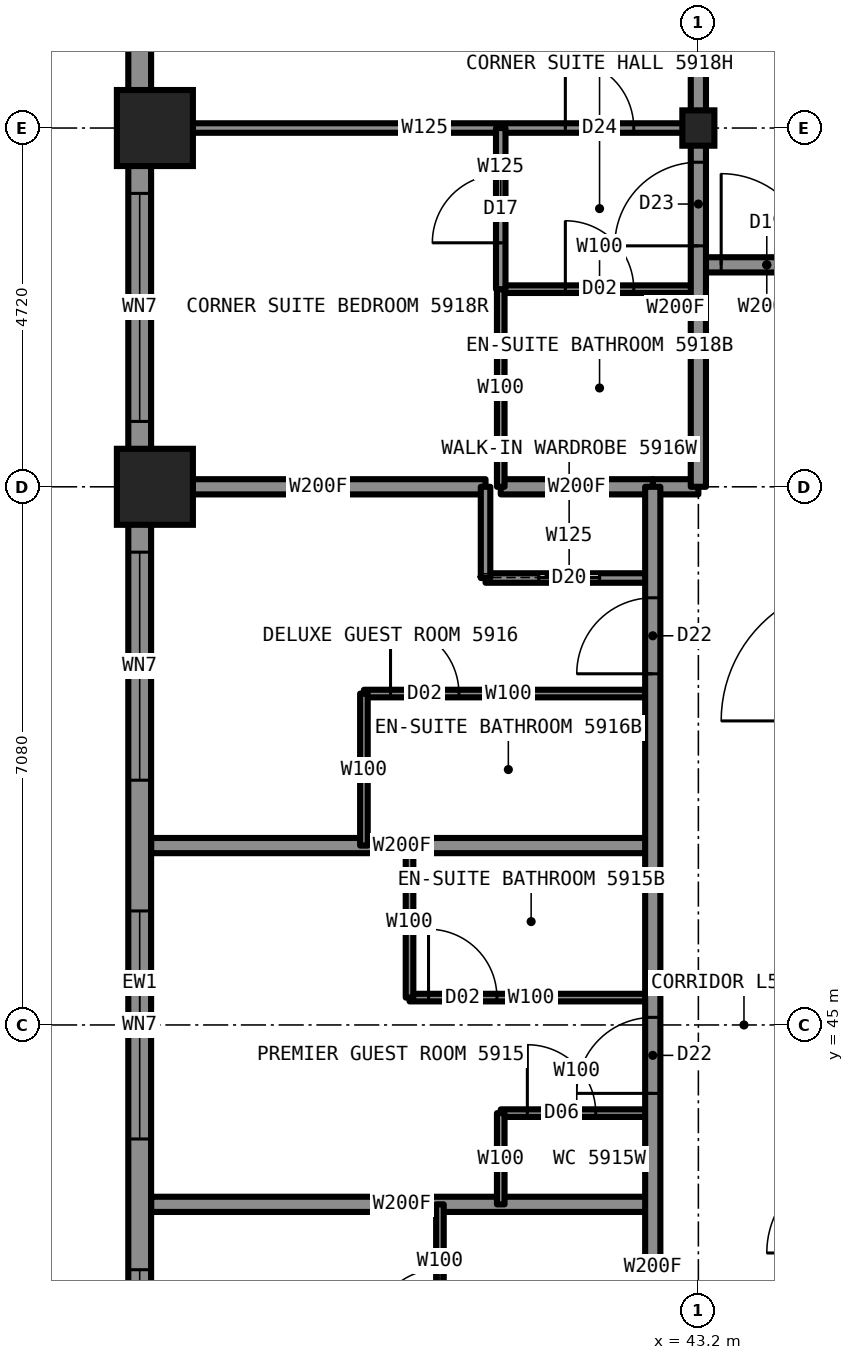
"""IFC4 building model, lengths in metres.
Left out: names, types, materials, properties, quantities, classifications, styles, units other than length and angle.
Written with IfcOpenShell. Run it as: python <this file> out.ifc"""

import sys

from ifc_helpers import new_model, si_unit, direction, frame, frame_2d, origin, origin_2d, place, context, subcontext, project, spatial, rectangle, i_section, extrude, element, fill, save


model = new_model("IFC4")
c1 = context("Model", 3, precision=1e-05, world=origin(), true_north=direction((0.0, 1.0)))
c2 = subcontext(c1, "Body", "Model", "MODEL_VIEW")
j1 = project(units=[si_unit("LENGTHUNIT", "METRE"), si_unit("PLANEANGLEUNIT", "RADIAN")], contexts=[c1])
p1 = place(None, origin())
s1 = spatial("IfcSite", under=j1, at=p1, CompositionType="ELEMENT")
p2 = place(p1, origin())
s2 = spatial("IfcBuilding", under=s1, at=p2, CompositionType="ELEMENT")
p3 = place(p2, frame((0.0, 0.0, 214.3)))
s3 = spatial("IfcBuildingStorey", under=s2, at=p3, CompositionType="ELEMENT", Elevation=214.3)
for number, where, z_axis, x_axis in (
    (1, (36.05, 52.08, 0.0), (0.0, 0.0, 1.0), (1.0, 0.0, 0.0)),
    (2, (36.05, 56.8, 0.0), (0.0, 0.0, 1.0), (1.0, 0.0, 0.0)),
):
    element("IfcColumn", number, at=place(p3, frame(where, z_axis=z_axis, x_axis=x_axis)), inside=s3, PredefinedType="COLUMN", context=c2, shape_type="SweptSolid", body=[
        extrude(i_section(OverallWidth=0.411, OverallDepth=0.434, WebThickness=0.036, FlangeThickness=0.057, at=origin_2d()), origin(), (0.0, 0.0, 1.0), 3.5),
    ])
p4 = place(p3, frame((43.2, 56.8, 0.0), z_axis=(0.0, 0.0, 1.0), x_axis=(1.0, 0.0, 0.0)))
e3 = element("IfcColumn", 3, at=p4, inside=s3, PredefinedType="COLUMN", context=c2, shape_type="SweptSolid", body=[
    extrude(i_section(OverallWidth=0.422, OverallDepth=0.465, WebThickness=0.045, FlangeThickness=0.073, at=origin_2d()), origin(), (0.0, 0.0, 1.0), 3.5),
])
p5 = place(p3, frame((40.6, 43.84, 0.0), z_axis=(0.0, 0.0, 1.0), x_axis=(1.0, 0.0, 0.0)))
e4 = element("IfcWall", 4, at=p5, inside=s3, PredefinedType="PARTITIONING", context=c2, shape_type="SweptSolid", body=[
    extrude(rectangle(XDim=2.0, YDim=0.1, at=frame_2d((1.0, 0.0))), origin(), (0.0, 0.0, 1.0), 3.33),
])
p6 = place(p5, frame((0.35, 0.0, 0.0)))
e5 = element("IfcOpeningElement", 5, at=p6, cuts=e4, PredefinedType="OPENING", context=c2, shape_type="SweptSolid", body=[
    extrude(rectangle(XDim=0.9, YDim=2.1, at=frame_2d((0.45, 1.05))), frame((0.0, 0.06, 0.0), z_axis=(0.0, -1.0, 0.0), x_axis=(1.0, 0.0, 0.0)), (0.0, 0.0, 1.0), 0.12),
])
p7 = place(p3, frame((36.0, 42.64, 0.0), z_axis=(0.0, 0.0, 1.0), x_axis=(1.0, 0.0, 0.0)))
e6 = element("IfcWall", 6, at=p7, inside=s3, PredefinedType="PARTITIONING", context=c2, shape_type="SweptSolid", body=[
    extrude(rectangle(XDim=6.6, YDim=0.2, at=frame_2d((3.3, 0.0))), origin(), (0.0, 0.0, 1.0), 2.73),
])
p8 = place(p3, frame((39.4, 45.36, 0.0), z_axis=(0.0, 0.0, 1.0), x_axis=(1.0, 0.0, 0.0)))
e7 = element("IfcWall", 7, at=p8, inside=s3, PredefinedType="PARTITIONING", context=c2, shape_type="SweptSolid", body=[
    extrude(rectangle(XDim=3.2, YDim=0.1, at=frame_2d((1.6, 0.0))), origin(), (0.0, 0.0, 1.0), 3.33),
])
p9 = place(p8, frame((0.25, 0.0, 0.0)))
e8 = element("IfcOpeningElement", 8, at=p9, cuts=e7, PredefinedType="OPENING", context=c2, shape_type="SweptSolid", body=[
    extrude(rectangle(XDim=0.9, YDim=2.1, at=frame_2d((0.45, 1.05))), frame((0.0, 0.06, 0.0), z_axis=(0.0, -1.0, 0.0), x_axis=(1.0, 0.0, 0.0)), (0.0, 0.0, 1.0), 0.12),
])
p10 = place(p3, frame((43.2, 55.0, 0.0), z_axis=(0.0, 0.0, 1.0), x_axis=(1.0, 0.0, 0.0)))
e9 = element("IfcWall", 9, at=p10, inside=s3, PredefinedType="PARTITIONING", context=c2, shape_type="SweptSolid", body=[
    extrude(rectangle(XDim=1.8, YDim=0.2, at=frame_2d((0.9, 0.0))), origin(), (0.0, 0.0, 1.0), 3.33),
])
p11 = place(p10, frame((0.3, 0.0, 0.0)))
e10 = element("IfcOpeningElement", 10, at=p11, cuts=e9, PredefinedType="OPENING", context=c2, shape_type="SweptSolid", body=[
    extrude(rectangle(XDim=1.2, YDim=2.2, at=frame_2d((0.6, 1.1))), frame((0.0, 0.11, 0.0), z_axis=(0.0, -1.0, 0.0), x_axis=(1.0, 0.0, 0.0)), (0.0, 0.0, 1.0), 0.22),
])
p12 = place(p3, frame((36.0, 56.8, 0.0), z_axis=(0.0, 0.0, 1.0), x_axis=(1.0, 0.0, 0.0)))
e11 = element("IfcWall", 11, at=p12, inside=s3, PredefinedType="PARTITIONING", context=c2, shape_type="SweptSolid", body=[
    extrude(rectangle(XDim=7.2, YDim=0.125, at=frame_2d((3.6, 0.0))), origin(), (0.0, 0.0, 1.0), 2.573),
])
p13 = place(p12, frame((5.45, 0.0, 0.0)))
e12 = element("IfcOpeningElement", 12, at=p13, cuts=e11, PredefinedType="OPENING", context=c2, shape_type="SweptSolid", body=[
    extrude(rectangle(XDim=0.9, YDim=2.2, at=frame_2d((0.45, 1.1))), frame((0.0, 0.073, 0.0), z_axis=(0.0, -1.0, 0.0), x_axis=(1.0, 0.0, 0.0)), (0.0, 0.0, 1.0), 0.145),
])
p14 = place(p3, frame((36.0, 47.36, 0.0), z_axis=(0.0, 0.0, 1.0), x_axis=(1.0, 0.0, 0.0)))
e13 = element("IfcWall", 13, at=p14, inside=s3, PredefinedType="PARTITIONING", context=c2, shape_type="SweptSolid", body=[
    extrude(rectangle(XDim=6.6, YDim=0.2, at=frame_2d((3.3, 0.0))), origin(), (0.0, 0.0, 1.0), 2.73),
])
p15 = place(p3, frame((38.8, 49.36, 0.0), z_axis=(0.0, 0.0, 1.0), x_axis=(1.0, 0.0, 0.0)))
e14 = element("IfcWall", 14, at=p15, inside=s3, PredefinedType="PARTITIONING", context=c2, shape_type="SweptSolid", body=[
    extrude(rectangle(XDim=3.8, YDim=0.1, at=frame_2d((1.9, 0.0))), origin(), (0.0, 0.0, 1.0), 3.33),
])
p16 = place(p15, frame((0.35, 0.0, 0.0)))
e15 = element("IfcOpeningElement", 15, at=p16, cuts=e14, PredefinedType="OPENING", context=c2, shape_type="SweptSolid", body=[
    extrude(rectangle(XDim=0.9, YDim=2.1, at=frame_2d((0.45, 1.05))), frame((0.0, 0.06, 0.0), z_axis=(0.0, -1.0, 0.0), x_axis=(1.0, 0.0, 0.0)), (0.0, 0.0, 1.0), 0.12),
])
p17 = place(p3, frame((40.4, 50.88, 0.0), z_axis=(0.0, 0.0, 1.0), x_axis=(1.0, 0.0, 0.0)))
e16 = element("IfcWall", 16, at=p17, inside=s3, PredefinedType="PARTITIONING", context=c2, shape_type="SweptSolid", body=[
    extrude(rectangle(XDim=2.2, YDim=0.125, at=frame_2d((1.1, 0.0))), origin(), (0.0, 0.0, 1.0), 3.33),
])
p18 = place(p17, frame((0.7, 0.0, 0.0)))
e17 = element("IfcOpeningElement", 17, at=p18, cuts=e16, PredefinedType="OPENING", context=c2, shape_type="SweptSolid", body=[
    extrude(rectangle(XDim=0.8, YDim=2.1, at=frame_2d((0.4, 1.05))), frame((0.0, 0.073, 0.0), z_axis=(0.0, -1.0, 0.0), x_axis=(1.0, 0.0, 0.0)), (0.0, 0.0, 1.0), 0.145),
])
p19 = place(p3, frame((42.6, 52.08, 0.0), z_axis=(0.0, 0.0, 1.0), x_axis=(1.0, 0.0, 0.0)))
e18 = element("IfcWall", 18, at=p19, inside=s3, PredefinedType="PARTITIONING", context=c2, shape_type="SweptSolid", body=[
    extrude(rectangle(XDim=0.6, YDim=0.2, at=frame_2d((0.3, 0.0))), origin(), (0.0, 0.0, 1.0), 2.573),
])
p20 = place(p3, frame((36.0, 52.08, 0.0), z_axis=(0.0, 0.0, 1.0), x_axis=(1.0, 0.0, 0.0)))
e19 = element("IfcWall", 19, at=p20, inside=s3, PredefinedType="PARTITIONING", context=c2, shape_type="SweptSolid", body=[
    extrude(rectangle(XDim=4.4, YDim=0.2, at=frame_2d((2.2, 0.0))), origin(), (0.0, 0.0, 1.0), 2.573),
])
p21 = place(p3, frame((40.6, 52.08, 0.0), z_axis=(0.0, 0.0, 1.0), x_axis=(1.0, 0.0, 0.0)))
e20 = element("IfcWall", 20, at=p21, inside=s3, PredefinedType="PARTITIONING", context=c2, shape_type="SweptSolid", body=[
    extrude(rectangle(XDim=2.0, YDim=0.2, at=frame_2d((1.0, 0.0))), origin(), (0.0, 0.0, 1.0), 2.573),
])
p22 = place(p3, frame((40.6, 54.68, 0.0), z_axis=(0.0, 0.0, 1.0), x_axis=(1.0, 0.0, 0.0)))
e21 = element("IfcWall", 21, at=p22, inside=s3, PredefinedType="PARTITIONING", context=c2, shape_type="SweptSolid", body=[
    extrude(rectangle(XDim=2.6, YDim=0.1, at=frame_2d((1.3, 0.0))), origin(), (0.0, 0.0, 1.0), 3.33),
])
p23 = place(p22, frame((0.85, 0.0, 0.0)))
e22 = element("IfcOpeningElement", 22, at=p23, cuts=e21, PredefinedType="OPENING", context=c2, shape_type="SweptSolid", body=[
    extrude(rectangle(XDim=0.9, YDim=2.1, at=frame_2d((0.45, 1.05))), frame((0.0, 0.06, 0.0), z_axis=(0.0, -1.0, 0.0), x_axis=(1.0, 0.0, 0.0)), (0.0, 0.0, 1.0), 0.12),
])
p24 = place(p3, frame((43.2, 52.08, 0.0), z_axis=(0.0, 0.0, 1.0), x_axis=(0.0, 1.0, 0.0)))
e23 = element("IfcWall", 23, at=p24, inside=s3, PredefinedType="PARTITIONING", context=c2, shape_type="SweptSolid", body=[
    extrude(rectangle(XDim=4.7, YDim=0.2, at=frame_2d((2.35, 0.0))), origin(), (0.0, 0.0, 1.0), 3.33),
])
p25 = place(p24, frame((3.17, 0.0, 0.0)))
e24 = element("IfcOpeningElement", 24, at=p25, cuts=e23, PredefinedType="OPENING", context=c2, shape_type="SweptSolid", body=[
    extrude(rectangle(XDim=1.1, YDim=2.2, at=frame_2d((0.55, 1.1))), frame((0.0, 0.11, 0.0), z_axis=(0.0, -1.0, 0.0), x_axis=(1.0, 0.0, 0.0)), (0.0, 0.0, 1.0), 0.22),
])
p26 = place(p3, frame((42.6, 37.92, 0.0), z_axis=(0.0, 0.0, 1.0), x_axis=(0.0, 1.0, 0.0)))
e25 = element("IfcWall", 25, at=p26, inside=s3, PredefinedType="PARTITIONING", context=c2, shape_type="SweptSolid", body=[
    extrude(rectangle(XDim=14.16, YDim=0.2, at=frame_2d((7.08, 0.0))), origin(), (0.0, 0.0, 1.0), 3.33),
])
p27 = place(p26, frame((0.4, 0.0, 0.0)))
e26 = element("IfcOpeningElement", 26, at=p27, cuts=e25, PredefinedType="OPENING", context=c2, shape_type="SweptSolid", body=[
    extrude(rectangle(XDim=1.0, YDim=2.2, at=frame_2d((0.5, 1.1))), frame((0.0, 0.11, 0.0), z_axis=(0.0, -1.0, 0.0), x_axis=(1.0, 0.0, 0.0)), (0.0, 0.0, 1.0), 0.22),
])
p28 = place(p26, frame((6.18, 0.0, 0.0)))
e27 = element("IfcOpeningElement", 27, at=p28, cuts=e25, PredefinedType="OPENING", context=c2, shape_type="SweptSolid", body=[
    extrude(rectangle(XDim=1.0, YDim=2.2, at=frame_2d((0.5, 1.1))), frame((0.0, 0.11, 0.0), z_axis=(0.0, -1.0, 0.0), x_axis=(1.0, 0.0, 0.0)), (0.0, 0.0, 1.0), 0.22),
])
p29 = place(p26, frame((11.7, 0.0, 0.0)))
e28 = element("IfcOpeningElement", 28, at=p29, cuts=e25, PredefinedType="OPENING", context=c2, shape_type="SweptSolid", body=[
    extrude(rectangle(XDim=1.0, YDim=2.2, at=frame_2d((0.5, 1.1))), frame((0.0, 0.11, 0.0), z_axis=(0.0, -1.0, 0.0), x_axis=(1.0, 0.0, 0.0)), (0.0, 0.0, 1.0), 0.22),
])
p30 = place(p3, frame((40.6, 42.64, 0.0), z_axis=(0.0, 0.0, 1.0), x_axis=(0.0, 1.0, 0.0)))
e29 = element("IfcWall", 29, at=p30, inside=s3, PredefinedType="PARTITIONING", context=c2, shape_type="SweptSolid", body=[
    extrude(rectangle(XDim=1.2, YDim=0.1, at=frame_2d((0.6, 0.0))), origin(), (0.0, 0.0, 1.0), 3.33),
])
p31 = place(p3, frame((40.6, 52.08, 0.0), z_axis=(0.0, 0.0, 1.0), x_axis=(0.0, 1.0, 0.0)))
e30 = element("IfcWall", 30, at=p31, inside=s3, PredefinedType="PARTITIONING", context=c2, shape_type="SweptSolid", body=[
    extrude(rectangle(XDim=2.6, YDim=0.1, at=frame_2d((1.3, 0.0))), origin(), (0.0, 0.0, 1.0), 3.33),
])
p32 = place(p3, frame((40.6, 54.68, 0.0), z_axis=(0.0, 0.0, 1.0), x_axis=(0.0, 1.0, 0.0)))
e31 = element("IfcWall", 31, at=p32, inside=s3, PredefinedType="PARTITIONING", context=c2, shape_type="SweptSolid", body=[
    extrude(rectangle(XDim=2.12, YDim=0.125, at=frame_2d((1.06, 0.0))), origin(), (0.0, 0.0, 1.0), 3.33),
])
p33 = place(p32, frame((0.61, 0.0, 0.0)))
e32 = element("IfcOpeningElement", 32, at=p33, cuts=e31, PredefinedType="OPENING", context=c2, shape_type="SweptSolid", body=[
    extrude(rectangle(XDim=0.9, YDim=2.2, at=frame_2d((0.45, 1.1))), frame((0.0, 0.073, 0.0), z_axis=(0.0, -1.0, 0.0), x_axis=(1.0, 0.0, 0.0)), (0.0, 0.0, 1.0), 0.145),
])
p34 = place(p3, frame((40.4, 50.88, 0.0), z_axis=(0.0, 0.0, 1.0), x_axis=(0.0, 1.0, 0.0)))
e33 = element("IfcWall", 33, at=p34, inside=s3, PredefinedType="PARTITIONING", context=c2, shape_type="SweptSolid", body=[
    extrude(rectangle(XDim=1.2, YDim=0.125, at=frame_2d((0.6, 0.0))), origin(), (0.0, 0.0, 1.0), 3.33),
])
p35 = place(p3, frame((39.8, 40.04, 0.0), z_axis=(0.0, 0.0, 1.0), x_axis=(0.0, 1.0, 0.0)))
e34 = element("IfcWall", 34, at=p35, inside=s3, PredefinedType="PARTITIONING", context=c2, shape_type="SweptSolid", body=[
    extrude(rectangle(XDim=2.6, YDim=0.1, at=frame_2d((1.3, 0.0))), origin(), (0.0, 0.0, 1.0), 3.33),
])
p36 = place(p35, frame((0.85, 0.0, 0.0)))
e35 = element("IfcOpeningElement", 35, at=p36, cuts=e34, PredefinedType="OPENING", context=c2, shape_type="SweptSolid", body=[
    extrude(rectangle(XDim=0.9, YDim=2.1, at=frame_2d((0.45, 1.05))), frame((0.0, 0.06, 0.0), z_axis=(0.0, -1.0, 0.0), x_axis=(1.0, 0.0, 0.0)), (0.0, 0.0, 1.0), 0.12),
])
for number, where, z_axis, x_axis in (
    (36, (39.4, 45.36, 0.0), (0.0, 0.0, 1.0), (0.0, 1.0, 0.0)),
    (37, (38.8, 47.36, 0.0), (0.0, 0.0, 1.0), (0.0, 1.0, 0.0)),
):
    element("IfcWall", number, at=place(p3, frame(where, z_axis=z_axis, x_axis=x_axis)), inside=s3, PredefinedType="PARTITIONING", context=c2, shape_type="SweptSolid", body=[
        extrude(rectangle(XDim=2.0, YDim=0.1, at=frame_2d((1.0, 0.0))), origin(), (0.0, 0.0, 1.0), 3.33),
    ])
p37 = place(p3, frame((35.85, 58.8, 0.0), z_axis=(0.0, 0.0, 1.0), x_axis=(0.0, -1.0, 0.0)))
e38 = element("IfcWall", 38, at=p37, inside=s3, PredefinedType="SOLIDWALL", context=c2, shape_type="SweptSolid", body=[
    extrude(rectangle(XDim=27.6, YDim=0.3, at=frame_2d((13.8, 0.0))), origin(), (0.0, 0.0, 1.0), 2.63),
])
p38 = place(p37, frame((2.86, 0.0, 0.3)))
e39 = element("IfcOpeningElement", 39, at=p38, cuts=e38, PredefinedType="OPENING", context=c2, shape_type="SweptSolid", body=[
    extrude(rectangle(XDim=3.0, YDim=2.0, at=frame_2d((1.5, 1.0))), frame((0.0, 0.16, 0.0), z_axis=(0.0, -1.0, 0.0), x_axis=(1.0, 0.0, 0.0)), (0.0, 0.0, 1.0), 0.32),
])
p39 = place(p37, frame((7.58, 0.0, 0.3)))
e40 = element("IfcOpeningElement", 40, at=p39, cuts=e38, PredefinedType="OPENING", context=c2, shape_type="SweptSolid", body=[
    extrude(rectangle(XDim=3.0, YDim=2.0, at=frame_2d((1.5, 1.0))), frame((0.0, 0.16, 0.0), z_axis=(0.0, -1.0, 0.0), x_axis=(1.0, 0.0, 0.0)), (0.0, 0.0, 1.0), 0.32),
])
p40 = place(p37, frame((12.3, 0.0, 0.3)))
e41 = element("IfcOpeningElement", 41, at=p40, cuts=e38, PredefinedType="OPENING", context=c2, shape_type="SweptSolid", body=[
    extrude(rectangle(XDim=3.0, YDim=2.0, at=frame_2d((1.5, 1.0))), frame((0.0, 0.16, 0.0), z_axis=(0.0, -1.0, 0.0), x_axis=(1.0, 0.0, 0.0)), (0.0, 0.0, 1.0), 0.32),
])
p41 = place(p37, frame((17.02, 0.0, 0.3)))
e42 = element("IfcOpeningElement", 42, at=p41, cuts=e38, PredefinedType="OPENING", context=c2, shape_type="SweptSolid", body=[
    extrude(rectangle(XDim=3.0, YDim=2.0, at=frame_2d((1.5, 1.0))), frame((0.0, 0.16, 0.0), z_axis=(0.0, -1.0, 0.0), x_axis=(1.0, 0.0, 0.0)), (0.0, 0.0, 1.0), 0.32),
])
p42 = place(p37, frame((21.74, 0.0, 0.3)))
e43 = element("IfcOpeningElement", 43, at=p42, cuts=e38, PredefinedType="OPENING", context=c2, shape_type="SweptSolid", body=[
    extrude(rectangle(XDim=3.0, YDim=2.0, at=frame_2d((1.5, 1.0))), frame((0.0, 0.16, 0.0), z_axis=(0.0, -1.0, 0.0), x_axis=(1.0, 0.0, 0.0)), (0.0, 0.0, 1.0), 0.32),
])
p43 = place(p3, frame((43.2, 56.78, 0.0), z_axis=(0.0, 0.0, 1.0), x_axis=(0.0, 1.0, 0.0)))
e44 = element("IfcWall", 44, at=p43, inside=s3, PredefinedType="PARTITIONING", context=c2, shape_type="SweptSolid", body=[
    extrude(rectangle(XDim=2.82, YDim=0.2, at=frame_2d((1.41, 0.0))), origin(), (0.0, 0.0, 1.0), 2.573),
])
p44 = place(p11, origin())
e45 = element("IfcDoor", 45, at=p44, inside=s3, OperationType="SINGLE_SWING_LEFT", PredefinedType="DOOR", context=c2, shape_type="SweptSolid", body=[
    extrude(rectangle(XDim=1.2, YDim=2.2, at=frame_2d((0.6, 1.1))), frame((0.0, 0.025, 0.0), z_axis=(0.0, -1.0, 0.0), x_axis=(1.0, 0.0, 0.0)), (0.0, 0.0, 1.0), 0.05),
])
fill(e10, e45)
p45 = place(p36, origin())
e46 = element("IfcDoor", 46, at=p45, inside=s3, OperationType="SINGLE_SWING_RIGHT", PredefinedType="DOOR", context=c2, shape_type="SweptSolid", body=[
    extrude(rectangle(XDim=0.9, YDim=2.1, at=frame_2d((0.45, 1.05))), frame((0.0, 0.025, 0.0), z_axis=(0.0, -1.0, 0.0), x_axis=(1.0, 0.0, 0.0)), (0.0, 0.0, 1.0), 0.05),
])
fill(e35, e46)
p46 = place(p28, origin())
e47 = element("IfcDoor", 47, at=p46, inside=s3, OperationType="SINGLE_SWING_LEFT", PredefinedType="DOOR", context=c2, shape_type="SweptSolid", body=[
    extrude(rectangle(XDim=1.0, YDim=2.2, at=frame_2d((0.5, 1.1))), frame((0.0, 0.025, 0.0), z_axis=(0.0, -1.0, 0.0), x_axis=(1.0, 0.0, 0.0)), (0.0, 0.0, 1.0), 0.05),
])
fill(e27, e47)
p47 = place(p9, origin())
e48 = element("IfcDoor", 48, at=p47, inside=s3, OperationType="SINGLE_SWING_RIGHT", PredefinedType="DOOR", context=c2, shape_type="SweptSolid", body=[
    extrude(rectangle(XDim=0.9, YDim=2.1, at=frame_2d((0.45, 1.05))), frame((0.0, 0.025, 0.0), z_axis=(0.0, -1.0, 0.0), x_axis=(1.0, 0.0, 0.0)), (0.0, 0.0, 1.0), 0.05),
])
fill(e8, e48)
p48 = place(p6, origin())
e49 = element("IfcDoor", 49, at=p48, inside=s3, OperationType="SINGLE_SWING_LEFT", PredefinedType="DOOR", context=c2, shape_type="SweptSolid", body=[
    extrude(rectangle(XDim=0.9, YDim=2.1, at=frame_2d((0.45, 1.05))), frame((0.0, 0.025, 0.0), z_axis=(0.0, -1.0, 0.0), x_axis=(1.0, 0.0, 0.0)), (0.0, 0.0, 1.0), 0.05),
])
fill(e5, e49)
p49 = place(p29, origin())
e50 = element("IfcDoor", 50, at=p49, inside=s3, OperationType="SINGLE_SWING_LEFT", PredefinedType="DOOR", context=c2, shape_type="SweptSolid", body=[
    extrude(rectangle(XDim=1.0, YDim=2.2, at=frame_2d((0.5, 1.1))), frame((0.0, 0.025, 0.0), z_axis=(0.0, -1.0, 0.0), x_axis=(1.0, 0.0, 0.0)), (0.0, 0.0, 1.0), 0.05),
])
fill(e28, e50)
p50 = place(p16, origin())
e51 = element("IfcDoor", 51, at=p50, inside=s3, OperationType="SINGLE_SWING_RIGHT", PredefinedType="DOOR", context=c2, shape_type="SweptSolid", body=[
    extrude(rectangle(XDim=0.9, YDim=2.1, at=frame_2d((0.45, 1.05))), frame((0.0, 0.025, 0.0), z_axis=(0.0, -1.0, 0.0), x_axis=(1.0, 0.0, 0.0)), (0.0, 0.0, 1.0), 0.05),
])
fill(e15, e51)
p51 = place(p18, origin())
e52 = element("IfcDoor", 52, at=p51, inside=s3, OperationType="SLIDING_TO_LEFT", PredefinedType="DOOR", context=c2, shape_type="SweptSolid", body=[
    extrude(rectangle(XDim=0.8, YDim=2.1, at=frame_2d((0.4, 1.05))), frame((0.0, 0.025, 0.0), z_axis=(0.0, -1.0, 0.0), x_axis=(1.0, 0.0, 0.0)), (0.0, 0.0, 1.0), 0.05),
])
fill(e17, e52)
p52 = place(p13, origin())
e53 = element("IfcDoor", 53, at=p52, inside=s3, OperationType="SINGLE_SWING_LEFT", PredefinedType="DOOR", context=c2, shape_type="SweptSolid", body=[
    extrude(rectangle(XDim=0.9, YDim=2.2, at=frame_2d((0.45, 1.1))), frame((0.0, 0.025, 0.0), z_axis=(0.0, -1.0, 0.0), x_axis=(1.0, 0.0, 0.0)), (0.0, 0.0, 1.0), 0.05),
])
fill(e12, e53)
p53 = place(p23, origin())
e54 = element("IfcDoor", 54, at=p53, inside=s3, OperationType="SINGLE_SWING_RIGHT", PredefinedType="DOOR", context=c2, shape_type="SweptSolid", body=[
    extrude(rectangle(XDim=0.9, YDim=2.1, at=frame_2d((0.45, 1.05))), frame((0.0, 0.025, 0.0), z_axis=(0.0, -1.0, 0.0), x_axis=(1.0, 0.0, 0.0)), (0.0, 0.0, 1.0), 0.05),
])
fill(e22, e54)
p54 = place(p25, origin())
e55 = element("IfcDoor", 55, at=p54, inside=s3, OperationType="SINGLE_SWING_LEFT", PredefinedType="DOOR", context=c2, shape_type="SweptSolid", body=[
    extrude(rectangle(XDim=1.1, YDim=2.2, at=frame_2d((0.55, 1.1))), frame((0.0, 0.025, 0.0), z_axis=(0.0, -1.0, 0.0), x_axis=(1.0, 0.0, 0.0)), (0.0, 0.0, 1.0), 0.05),
])
fill(e24, e55)
p55 = place(p33, origin())
e56 = element("IfcDoor", 56, at=p55, inside=s3, OperationType="SINGLE_SWING_LEFT", PredefinedType="DOOR", context=c2, shape_type="SweptSolid", body=[
    extrude(rectangle(XDim=0.9, YDim=2.2, at=frame_2d((0.45, 1.1))), frame((0.0, 0.025, 0.0), z_axis=(0.0, -1.0, 0.0), x_axis=(1.0, 0.0, 0.0)), (0.0, 0.0, 1.0), 0.05),
])
fill(e32, e56)
p56 = place(p38, origin())
e57 = element("IfcWindow", 57, at=p56, inside=s3, PartitioningType="SINGLE_PANEL", PredefinedType="WINDOW", context=c2, shape_type="SweptSolid", body=[
    extrude(rectangle(XDim=3.0, YDim=2.0, at=frame_2d((1.5, 1.0))), frame((0.0, 0.13, 0.0), z_axis=(0.0, -1.0, 0.0), x_axis=(1.0, 0.0, 0.0)), (0.0, 0.0, 1.0), 0.06),
])
fill(e39, e57)
p57 = place(p39, origin())
e58 = element("IfcWindow", 58, at=p57, inside=s3, PartitioningType="SINGLE_PANEL", PredefinedType="WINDOW", context=c2, shape_type="SweptSolid", body=[
    extrude(rectangle(XDim=3.0, YDim=2.0, at=frame_2d((1.5, 1.0))), frame((0.0, 0.13, 0.0), z_axis=(0.0, -1.0, 0.0), x_axis=(1.0, 0.0, 0.0)), (0.0, 0.0, 1.0), 0.06),
])
fill(e40, e58)
p58 = place(p40, origin())
e59 = element("IfcWindow", 59, at=p58, inside=s3, PartitioningType="SINGLE_PANEL", PredefinedType="WINDOW", context=c2, shape_type="SweptSolid", body=[
    extrude(rectangle(XDim=3.0, YDim=2.0, at=frame_2d((1.5, 1.0))), frame((0.0, 0.13, 0.0), z_axis=(0.0, -1.0, 0.0), x_axis=(1.0, 0.0, 0.0)), (0.0, 0.0, 1.0), 0.06),
])
fill(e41, e59)
p59 = place(p41, origin())
e60 = element("IfcWindow", 60, at=p59, inside=s3, PartitioningType="SINGLE_PANEL", PredefinedType="WINDOW", context=c2, shape_type="SweptSolid", body=[
    extrude(rectangle(XDim=3.0, YDim=2.0, at=frame_2d((1.5, 1.0))), frame((0.0, 0.13, 0.0), z_axis=(0.0, -1.0, 0.0), x_axis=(1.0, 0.0, 0.0)), (0.0, 0.0, 1.0), 0.06),
])
fill(e42, e60)
save(model, sys.argv[1])
